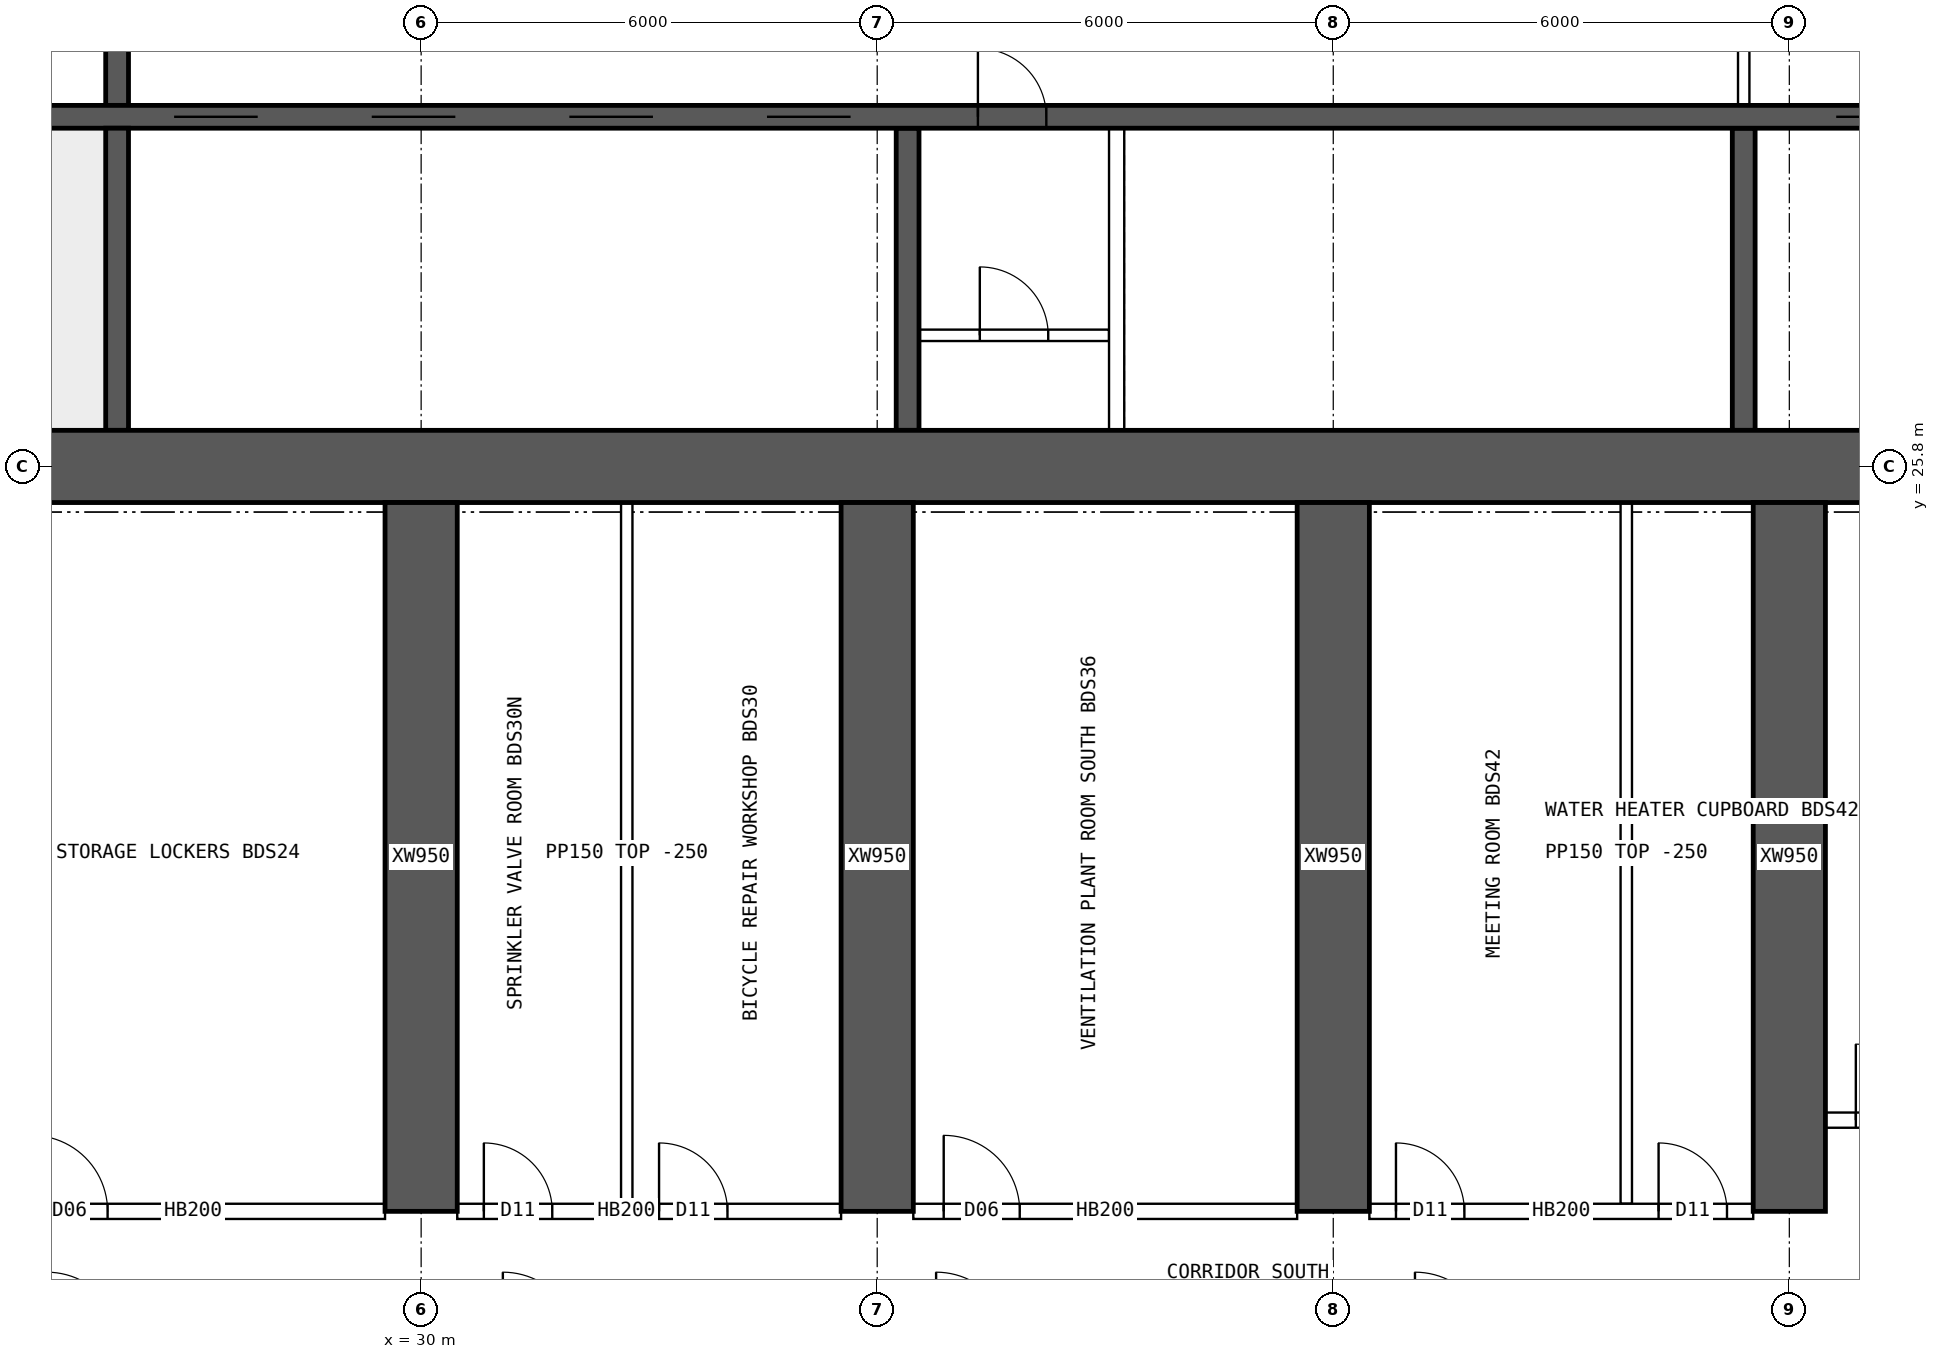
"""IFC4 building model, lengths in metres.
Left out: names, types, materials, properties, quantities, classifications, styles, units other than length and angle.
Written with IfcOpenShell. Run it as: python <this file> out.ifc"""

import sys

from ifc_helpers import new_model, si_unit, direction, frame, frame_2d, origin, place, context, subcontext, project, spatial, rectangle, extrude, element, fill, save


model = new_model("IFC4")
c1 = context("Model", 3, precision=1e-05, world=origin(), true_north=direction((0.0, 1.0)))
c2 = subcontext(c1, "Body", "Model", "MODEL_VIEW")
j1 = project(units=[si_unit("LENGTHUNIT", "METRE"), si_unit("PLANEANGLEUNIT", "RADIAN")], contexts=[c1])
p1 = place(None, origin())
s1 = spatial("IfcSite", under=j1, at=p1, CompositionType="ELEMENT")
p2 = place(p1, origin())
s2 = spatial("IfcBuilding", under=s1, at=p2, CompositionType="ELEMENT")
p3 = place(p2, frame((0.0, 0.0, 125.65)))
s3 = spatial("IfcBuildingStorey", under=s2, at=p3, CompositionType="ELEMENT", Elevation=125.65)
p4 = place(p3, frame((18.0, 25.8, 0.0), z_axis=(0.0, 0.0, 1.0), x_axis=(1.0, 0.0, 0.0)))
e1 = element("IfcWall", 1, at=p4, inside=s3, PredefinedType="SHEAR", context=c2, shape_type="SweptSolid", body=[
    extrude(rectangle(XDim=48.0, YDim=0.95, at=frame_2d((24.0, 0.0))), origin(), (0.0, 0.0, 1.0), 3.75),
])
p5 = place(p3, frame((18.475, 30.4, 0.0), z_axis=(0.0, 0.0, 1.0), x_axis=(1.0, 0.0, 0.0)))
e2 = element("IfcWall", 2, at=p5, inside=s3, PredefinedType="SHEAR", context=c2, shape_type="SweptSolid", body=[
    extrude(rectangle(XDim=47.05, YDim=0.3, at=frame_2d((23.525, 0.0))), origin(), (0.0, 0.0, 1.0), 3.75),
])
p6 = place(p5, frame((0.4, 0.0, 0.0)))
e3 = element("IfcOpeningElement", 3, at=p6, cuts=e2, PredefinedType="OPENING", context=c2, shape_type="SweptSolid", body=[
    extrude(rectangle(XDim=1.0, YDim=2.1, at=frame_2d((0.5, 1.05))), frame((0.0, 0.16, 0.0), z_axis=(0.0, -1.0, 0.0), x_axis=(1.0, 0.0, 0.0)), (0.0, 0.0, 1.0), 0.32),
])
p7 = place(p5, frame((45.65, 0.0, 0.0)))
e4 = element("IfcOpeningElement", 4, at=p7, cuts=e2, PredefinedType="OPENING", context=c2, shape_type="SweptSolid", body=[
    extrude(rectangle(XDim=1.0, YDim=2.1, at=frame_2d((0.5, 1.05))), frame((0.0, 0.16, 0.0), z_axis=(0.0, -1.0, 0.0), x_axis=(1.0, 0.0, 0.0)), (0.0, 0.0, 1.0), 0.32),
])
p8 = place(p5, frame((8.275, 0.0, 0.0)))
e5 = element("IfcOpeningElement", 5, at=p8, cuts=e2, PredefinedType="OPENING", context=c2, shape_type="SweptSolid", body=[
    extrude(rectangle(XDim=1.1, YDim=2.1, at=frame_2d((0.55, 1.05))), frame((0.0, 0.16, 0.0), z_axis=(0.0, -1.0, 0.0), x_axis=(1.0, 0.0, 0.0)), (0.0, 0.0, 1.0), 0.32),
])
p9 = place(p5, frame((10.875, 0.0, 0.0)))
e6 = element("IfcOpeningElement", 6, at=p9, cuts=e2, PredefinedType="OPENING", context=c2, shape_type="SweptSolid", body=[
    extrude(rectangle(XDim=1.1, YDim=2.1, at=frame_2d((0.55, 1.05))), frame((0.0, 0.16, 0.0), z_axis=(0.0, -1.0, 0.0), x_axis=(1.0, 0.0, 0.0)), (0.0, 0.0, 1.0), 0.32),
])
p10 = place(p5, frame((13.475, 0.0, 0.0)))
e7 = element("IfcOpeningElement", 7, at=p10, cuts=e2, PredefinedType="OPENING", context=c2, shape_type="SweptSolid", body=[
    extrude(rectangle(XDim=1.1, YDim=2.1, at=frame_2d((0.55, 1.05))), frame((0.0, 0.16, 0.0), z_axis=(0.0, -1.0, 0.0), x_axis=(1.0, 0.0, 0.0)), (0.0, 0.0, 1.0), 0.32),
])
p11 = place(p5, frame((16.075, 0.0, 0.0)))
e8 = element("IfcOpeningElement", 8, at=p11, cuts=e2, PredefinedType="OPENING", context=c2, shape_type="SweptSolid", body=[
    extrude(rectangle(XDim=1.1, YDim=2.1, at=frame_2d((0.55, 1.05))), frame((0.0, 0.16, 0.0), z_axis=(0.0, -1.0, 0.0), x_axis=(1.0, 0.0, 0.0)), (0.0, 0.0, 1.0), 0.32),
])
p12 = place(p5, frame((18.85, 0.0, 0.0)))
e9 = element("IfcOpeningElement", 9, at=p12, cuts=e2, PredefinedType="OPENING", context=c2, shape_type="SweptSolid", body=[
    extrude(rectangle(XDim=0.9, YDim=2.1, at=frame_2d((0.45, 1.05))), frame((0.0, 0.16, 0.0), z_axis=(0.0, -1.0, 0.0), x_axis=(1.0, 0.0, 0.0)), (0.0, 0.0, 1.0), 0.32),
])
p13 = place(p5, frame((30.142, 0.0, 0.0)))
e10 = element("IfcOpeningElement", 10, at=p13, cuts=e2, PredefinedType="OPENING", context=c2, shape_type="SweptSolid", body=[
    extrude(rectangle(XDim=1.1, YDim=2.1, at=frame_2d((0.55, 1.05))), frame((0.0, 0.16, 0.0), z_axis=(0.0, -1.0, 0.0), x_axis=(1.0, 0.0, 0.0)), (0.0, 0.0, 1.0), 0.32),
])
p14 = place(p5, frame((33.675, 0.0, 0.0)))
e11 = element("IfcOpeningElement", 11, at=p14, cuts=e2, PredefinedType="OPENING", context=c2, shape_type="SweptSolid", body=[
    extrude(rectangle(XDim=1.1, YDim=2.1, at=frame_2d((0.55, 1.05))), frame((0.0, 0.16, 0.0), z_axis=(0.0, -1.0, 0.0), x_axis=(1.0, 0.0, 0.0)), (0.0, 0.0, 1.0), 0.32),
])
p15 = place(p5, frame((37.208, 0.0, 0.0)))
e12 = element("IfcOpeningElement", 12, at=p15, cuts=e2, PredefinedType="OPENING", context=c2, shape_type="SweptSolid", body=[
    extrude(rectangle(XDim=1.1, YDim=2.1, at=frame_2d((0.55, 1.05))), frame((0.0, 0.16, 0.0), z_axis=(0.0, -1.0, 0.0), x_axis=(1.0, 0.0, 0.0)), (0.0, 0.0, 1.0), 0.32),
])
p16 = place(p3, frame((26.0, 26.275, 0.0), z_axis=(0.0, 0.0, 1.0), x_axis=(0.0, 1.0, 0.0)))
e13 = element("IfcWall", 13, at=p16, inside=s3, PredefinedType="SHEAR", context=c2, shape_type="SweptSolid", body=[
    extrude(rectangle(XDim=3.975, YDim=0.3, at=frame_2d((1.988, 0.0))), origin(), (0.0, 0.0, 1.0), 3.75),
])
p17 = place(p3, frame((26.0, 30.55, 0.0), z_axis=(0.0, 0.0, 1.0), x_axis=(0.0, 1.0, 0.0)))
e14 = element("IfcWall", 14, at=p17, inside=s3, PredefinedType="SHEAR", context=c2, shape_type="SweptSolid", body=[
    extrude(rectangle(XDim=3.9, YDim=0.3, at=frame_2d((1.95, 0.0))), origin(), (0.0, 0.0, 1.0), 3.75),
])
p18 = place(p17, frame((1.4, 0.0, 0.0)))
e15 = element("IfcOpeningElement", 15, at=p18, cuts=e14, PredefinedType="OPENING", context=c2, shape_type="SweptSolid", body=[
    extrude(rectangle(XDim=1.2, YDim=2.1, at=frame_2d((0.6, 1.05))), frame((0.0, 0.16, 0.0), z_axis=(0.0, -1.0, 0.0), x_axis=(1.0, 0.0, 0.0)), (0.0, 0.0, 1.0), 0.32),
])
for number, where, z_axis, x_axis in (
    (16, (36.4, 26.275, 0.0), (0.0, 0.0, 1.0), (0.0, 1.0, 0.0)),
    (17, (47.4, 26.275, 0.0), (0.0, 0.0, 1.0), (0.0, 1.0, 0.0)),
):
    element("IfcWall", number, at=place(p3, frame(where, z_axis=z_axis, x_axis=x_axis)), inside=s3, PredefinedType="SHEAR", context=c2, shape_type="SweptSolid", body=[
        extrude(rectangle(XDim=3.975, YDim=0.3, at=frame_2d((1.988, 0.0))), origin(), (0.0, 0.0, 1.0), 3.75),
    ])
for number, where, z_axis, x_axis in (
    (18, (30.0, 16.0, 0.0), (0.0, 0.0, 1.0), (0.0, 1.0, 0.0)),
    (19, (36.0, 16.0, 0.0), (0.0, 0.0, 1.0), (0.0, 1.0, 0.0)),
    (20, (42.0, 16.0, 0.0), (0.0, 0.0, 1.0), (0.0, 1.0, 0.0)),
    (21, (48.0, 16.0, 0.0), (0.0, 0.0, 1.0), (0.0, 1.0, 0.0)),
):
    element("IfcWall", number, at=place(p3, frame(where, z_axis=z_axis, x_axis=x_axis)), inside=s3, PredefinedType="SHEAR", context=c2, shape_type="SweptSolid", body=[
        extrude(rectangle(XDim=9.325, YDim=0.95, at=frame_2d((4.663, 0.0))), origin(), (0.0, 0.0, 1.0), 3.75),
    ])
p19 = place(p3, frame((47.4, 30.55, 0.0), z_axis=(0.0, 0.0, 1.0), x_axis=(0.0, 1.0, 0.0)))
e22 = element("IfcWall", 22, at=p19, inside=s3, PredefinedType="SOLIDWALL", context=c2, shape_type="SweptSolid", body=[
    extrude(rectangle(XDim=3.9, YDim=0.15, at=frame_2d((1.95, 0.0))), origin(), (0.0, 0.0, 1.0), 3.5),
])
p20 = place(p19, frame((1.15, 0.0, 0.0)))
e23 = element("IfcOpeningElement", 23, at=p20, cuts=e22, PredefinedType="OPENING", context=c2, shape_type="SweptSolid", body=[
    extrude(rectangle(XDim=1.6, YDim=2.1, at=frame_2d((0.8, 1.05))), frame((0.0, 0.085, 0.0), z_axis=(0.0, -1.0, 0.0), x_axis=(1.0, 0.0, 0.0)), (0.0, 0.0, 1.0), 0.17),
])
p21 = place(p3, frame((36.55, 27.525, 0.0), z_axis=(0.0, 0.0, 1.0), x_axis=(1.0, 0.0, 0.0)))
e24 = element("IfcWall", 24, at=p21, inside=s3, PredefinedType="SOLIDWALL", context=c2, shape_type="SweptSolid", body=[
    extrude(rectangle(XDim=2.5, YDim=0.15, at=frame_2d((1.25, 0.0))), origin(), (0.0, 0.0, 1.0), 3.5),
])
p22 = place(p21, frame((0.8, 0.0, 0.0)))
e25 = element("IfcOpeningElement", 25, at=p22, cuts=e24, PredefinedType="OPENING", context=c2, shape_type="SweptSolid", body=[
    extrude(rectangle(XDim=0.9, YDim=2.1, at=frame_2d((0.45, 1.05))), frame((0.0, 0.085, 0.0), z_axis=(0.0, -1.0, 0.0), x_axis=(1.0, 0.0, 0.0)), (0.0, 0.0, 1.0), 0.17),
])
p23 = place(p3, frame((39.15, 26.275, 0.0), z_axis=(0.0, 0.0, 1.0), x_axis=(0.0, 1.0, 0.0)))
e26 = element("IfcWall", 26, at=p23, inside=s3, PredefinedType="SOLIDWALL", context=c2, shape_type="SweptSolid", body=[
    extrude(rectangle(XDim=3.975, YDim=0.2, at=frame_2d((1.988, 0.0))), origin(), (0.0, 0.0, 1.0), 3.5),
])
p24 = place(p3, frame((24.475, 16.0, 0.0), z_axis=(0.0, 0.0, 1.0), x_axis=(1.0, 0.0, 0.0)))
e27 = element("IfcWall", 27, at=p24, inside=s3, PredefinedType="SOLIDWALL", context=c2, shape_type="SweptSolid", body=[
    extrude(rectangle(XDim=5.05, YDim=0.2, at=frame_2d((2.525, 0.0))), origin(), (0.0, 0.0, 1.0), 3.5),
])
p25 = place(p24, frame((0.4, 0.0, 0.0)))
e28 = element("IfcOpeningElement", 28, at=p25, cuts=e27, PredefinedType="OPENING", context=c2, shape_type="SweptSolid", body=[
    extrude(rectangle(XDim=1.0, YDim=2.1, at=frame_2d((0.5, 1.05))), frame((0.0, 0.11, 0.0), z_axis=(0.0, -1.0, 0.0), x_axis=(1.0, 0.0, 0.0)), (0.0, 0.0, 1.0), 0.22),
])
p26 = place(p3, frame((30.475, 16.0, 0.0), z_axis=(0.0, 0.0, 1.0), x_axis=(1.0, 0.0, 0.0)))
e29 = element("IfcWall", 29, at=p26, inside=s3, PredefinedType="SOLIDWALL", context=c2, shape_type="SweptSolid", body=[
    extrude(rectangle(XDim=5.05, YDim=0.2, at=frame_2d((2.525, 0.0))), origin(), (0.0, 0.0, 1.0), 3.5),
])
p27 = place(p26, frame((0.35, 0.0, 0.0)))
e30 = element("IfcOpeningElement", 30, at=p27, cuts=e29, PredefinedType="OPENING", context=c2, shape_type="SweptSolid", body=[
    extrude(rectangle(XDim=0.9, YDim=2.1, at=frame_2d((0.45, 1.05))), frame((0.0, 0.11, 0.0), z_axis=(0.0, -1.0, 0.0), x_axis=(1.0, 0.0, 0.0)), (0.0, 0.0, 1.0), 0.22),
])
p28 = place(p26, frame((2.655, 0.0, 0.0)))
e31 = element("IfcOpeningElement", 31, at=p28, cuts=e29, PredefinedType="OPENING", context=c2, shape_type="SweptSolid", body=[
    extrude(rectangle(XDim=0.9, YDim=2.1, at=frame_2d((0.45, 1.05))), frame((0.0, 0.11, 0.0), z_axis=(0.0, -1.0, 0.0), x_axis=(1.0, 0.0, 0.0)), (0.0, 0.0, 1.0), 0.22),
])
p29 = place(p3, frame((36.475, 16.0, 0.0), z_axis=(0.0, 0.0, 1.0), x_axis=(1.0, 0.0, 0.0)))
e32 = element("IfcWall", 32, at=p29, inside=s3, PredefinedType="SOLIDWALL", context=c2, shape_type="SweptSolid", body=[
    extrude(rectangle(XDim=5.05, YDim=0.2, at=frame_2d((2.525, 0.0))), origin(), (0.0, 0.0, 1.0), 3.5),
])
p30 = place(p29, frame((0.4, 0.0, 0.0)))
e33 = element("IfcOpeningElement", 33, at=p30, cuts=e32, PredefinedType="OPENING", context=c2, shape_type="SweptSolid", body=[
    extrude(rectangle(XDim=1.0, YDim=2.1, at=frame_2d((0.5, 1.05))), frame((0.0, 0.11, 0.0), z_axis=(0.0, -1.0, 0.0), x_axis=(1.0, 0.0, 0.0)), (0.0, 0.0, 1.0), 0.22),
])
p31 = place(p3, frame((42.475, 16.0, 0.0), z_axis=(0.0, 0.0, 1.0), x_axis=(1.0, 0.0, 0.0)))
e34 = element("IfcWall", 34, at=p31, inside=s3, PredefinedType="SOLIDWALL", context=c2, shape_type="SweptSolid", body=[
    extrude(rectangle(XDim=5.05, YDim=0.2, at=frame_2d((2.525, 0.0))), origin(), (0.0, 0.0, 1.0), 3.5),
])
p32 = place(p31, frame((0.35, 0.0, 0.0)))
e35 = element("IfcOpeningElement", 35, at=p32, cuts=e34, PredefinedType="OPENING", context=c2, shape_type="SweptSolid", body=[
    extrude(rectangle(XDim=0.9, YDim=2.1, at=frame_2d((0.45, 1.05))), frame((0.0, 0.11, 0.0), z_axis=(0.0, -1.0, 0.0), x_axis=(1.0, 0.0, 0.0)), (0.0, 0.0, 1.0), 0.22),
])
p33 = place(p31, frame((3.805, 0.0, 0.0)))
e36 = element("IfcOpeningElement", 36, at=p33, cuts=e34, PredefinedType="OPENING", context=c2, shape_type="SweptSolid", body=[
    extrude(rectangle(XDim=0.9, YDim=2.1, at=frame_2d((0.45, 1.05))), frame((0.0, 0.11, 0.0), z_axis=(0.0, -1.0, 0.0), x_axis=(1.0, 0.0, 0.0)), (0.0, 0.0, 1.0), 0.22),
])
for number, where, z_axis, x_axis in (
    (37, (32.705, 16.1, 0.0), (0.0, 0.0, 1.0), (0.0, 1.0, 0.0)),
    (38, (45.855, 16.1, 0.0), (0.0, 0.0, 1.0), (0.0, 1.0, 0.0)),
):
    element("IfcWall", number, at=place(p3, frame(where, z_axis=z_axis, x_axis=x_axis)), inside=s3, PredefinedType="PARTITIONING", context=c2, shape_type="SweptSolid", body=[
        extrude(rectangle(XDim=9.225, YDim=0.15, at=frame_2d((4.612, 0.0))), origin(), (0.0, 0.0, 1.0), 3.5),
    ])
p34 = place(p3, frame((48.475, 17.2, 0.0), z_axis=(0.0, 0.0, 1.0), x_axis=(1.0, 0.0, 0.0)))
e39 = element("IfcWall", 39, at=p34, inside=s3, PredefinedType="SOLIDWALL", context=c2, shape_type="SweptSolid", body=[
    extrude(rectangle(XDim=5.05, YDim=0.2, at=frame_2d((2.525, 0.0))), origin(), (0.0, 0.0, 1.0), 3.5),
])
p35 = place(p34, frame((0.4, 0.0, 0.0)))
e40 = element("IfcOpeningElement", 40, at=p35, cuts=e39, PredefinedType="OPENING", context=c2, shape_type="SweptSolid", body=[
    extrude(rectangle(XDim=1.0, YDim=2.1, at=frame_2d((0.5, 1.05))), frame((0.0, 0.11, 0.0), z_axis=(0.0, -1.0, 0.0), x_axis=(1.0, 0.0, 0.0)), (0.0, 0.0, 1.0), 0.22),
])
p36 = place(p8, origin())
e41 = element("IfcDoor", 41, at=p36, inside=s3, OperationType="DOUBLE_DOOR_SLIDING", PredefinedType="DOOR", context=c2, shape_type="SweptSolid", body=[
    extrude(rectangle(XDim=1.1, YDim=2.1, at=frame_2d((0.55, 1.05))), frame((0.0, 0.025, 0.0), z_axis=(0.0, -1.0, 0.0), x_axis=(1.0, 0.0, 0.0)), (0.0, 0.0, 1.0), 0.05),
])
fill(e5, e41)
p37 = place(p9, origin())
e42 = element("IfcDoor", 42, at=p37, inside=s3, OperationType="DOUBLE_DOOR_SLIDING", PredefinedType="DOOR", context=c2, shape_type="SweptSolid", body=[
    extrude(rectangle(XDim=1.1, YDim=2.1, at=frame_2d((0.55, 1.05))), frame((0.0, 0.025, 0.0), z_axis=(0.0, -1.0, 0.0), x_axis=(1.0, 0.0, 0.0)), (0.0, 0.0, 1.0), 0.05),
])
fill(e6, e42)
p38 = place(p10, origin())
e43 = element("IfcDoor", 43, at=p38, inside=s3, OperationType="DOUBLE_DOOR_SLIDING", PredefinedType="DOOR", context=c2, shape_type="SweptSolid", body=[
    extrude(rectangle(XDim=1.1, YDim=2.1, at=frame_2d((0.55, 1.05))), frame((0.0, 0.025, 0.0), z_axis=(0.0, -1.0, 0.0), x_axis=(1.0, 0.0, 0.0)), (0.0, 0.0, 1.0), 0.05),
])
fill(e7, e43)
p39 = place(p11, origin())
e44 = element("IfcDoor", 44, at=p39, inside=s3, OperationType="DOUBLE_DOOR_SLIDING", PredefinedType="DOOR", context=c2, shape_type="SweptSolid", body=[
    extrude(rectangle(XDim=1.1, YDim=2.1, at=frame_2d((0.55, 1.05))), frame((0.0, 0.025, 0.0), z_axis=(0.0, -1.0, 0.0), x_axis=(1.0, 0.0, 0.0)), (0.0, 0.0, 1.0), 0.05),
])
fill(e8, e44)
p40 = place(p22, origin())
e45 = element("IfcDoor", 45, at=p40, inside=s3, OperationType="SINGLE_SWING_LEFT", PredefinedType="DOOR", context=c2, shape_type="SweptSolid", body=[
    extrude(rectangle(XDim=0.9, YDim=2.1, at=frame_2d((0.45, 1.05))), frame((0.0, 0.025, 0.0), z_axis=(0.0, -1.0, 0.0), x_axis=(1.0, 0.0, 0.0)), (0.0, 0.0, 1.0), 0.05),
])
fill(e25, e45)
p41 = place(p12, origin())
e46 = element("IfcDoor", 46, at=p41, inside=s3, OperationType="SINGLE_SWING_LEFT", PredefinedType="DOOR", context=c2, shape_type="SweptSolid", body=[
    extrude(rectangle(XDim=0.9, YDim=2.1, at=frame_2d((0.45, 1.05))), frame((0.0, 0.025, 0.0), z_axis=(0.0, -1.0, 0.0), x_axis=(1.0, 0.0, 0.0)), (0.0, 0.0, 1.0), 0.05),
])
fill(e9, e46)
p42 = place(p13, origin())
e47 = element("IfcDoor", 47, at=p42, inside=s3, OperationType="DOUBLE_DOOR_SLIDING", PredefinedType="DOOR", context=c2, shape_type="SweptSolid", body=[
    extrude(rectangle(XDim=1.1, YDim=2.1, at=frame_2d((0.55, 1.05))), frame((0.0, 0.025, 0.0), z_axis=(0.0, -1.0, 0.0), x_axis=(1.0, 0.0, 0.0)), (0.0, 0.0, 1.0), 0.05),
])
fill(e10, e47)
p43 = place(p25, origin())
e48 = element("IfcDoor", 48, at=p43, inside=s3, OperationType="SINGLE_SWING_LEFT", PredefinedType="DOOR", context=c2, shape_type="SweptSolid", body=[
    extrude(rectangle(XDim=1.0, YDim=2.1, at=frame_2d((0.5, 1.05))), frame((0.0, 0.025, 0.0), z_axis=(0.0, -1.0, 0.0), x_axis=(1.0, 0.0, 0.0)), (0.0, 0.0, 1.0), 0.05),
])
fill(e28, e48)
p44 = place(p27, origin())
e49 = element("IfcDoor", 49, at=p44, inside=s3, OperationType="SINGLE_SWING_LEFT", PredefinedType="DOOR", context=c2, shape_type="SweptSolid", body=[
    extrude(rectangle(XDim=0.9, YDim=2.1, at=frame_2d((0.45, 1.05))), frame((0.0, 0.025, 0.0), z_axis=(0.0, -1.0, 0.0), x_axis=(1.0, 0.0, 0.0)), (0.0, 0.0, 1.0), 0.05),
])
fill(e30, e49)
p45 = place(p28, origin())
e50 = element("IfcDoor", 50, at=p45, inside=s3, OperationType="SINGLE_SWING_LEFT", PredefinedType="DOOR", context=c2, shape_type="SweptSolid", body=[
    extrude(rectangle(XDim=0.9, YDim=2.1, at=frame_2d((0.45, 1.05))), frame((0.0, 0.025, 0.0), z_axis=(0.0, -1.0, 0.0), x_axis=(1.0, 0.0, 0.0)), (0.0, 0.0, 1.0), 0.05),
])
fill(e31, e50)
p46 = place(p30, origin())
e51 = element("IfcDoor", 51, at=p46, inside=s3, OperationType="SINGLE_SWING_LEFT", PredefinedType="DOOR", context=c2, shape_type="SweptSolid", body=[
    extrude(rectangle(XDim=1.0, YDim=2.1, at=frame_2d((0.5, 1.05))), frame((0.0, 0.025, 0.0), z_axis=(0.0, -1.0, 0.0), x_axis=(1.0, 0.0, 0.0)), (0.0, 0.0, 1.0), 0.05),
])
fill(e33, e51)
p47 = place(p32, origin())
e52 = element("IfcDoor", 52, at=p47, inside=s3, OperationType="SINGLE_SWING_LEFT", PredefinedType="DOOR", context=c2, shape_type="SweptSolid", body=[
    extrude(rectangle(XDim=0.9, YDim=2.1, at=frame_2d((0.45, 1.05))), frame((0.0, 0.025, 0.0), z_axis=(0.0, -1.0, 0.0), x_axis=(1.0, 0.0, 0.0)), (0.0, 0.0, 1.0), 0.05),
])
fill(e35, e52)
p48 = place(p33, origin())
e53 = element("IfcDoor", 53, at=p48, inside=s3, OperationType="SINGLE_SWING_LEFT", PredefinedType="DOOR", context=c2, shape_type="SweptSolid", body=[
    extrude(rectangle(XDim=0.9, YDim=2.1, at=frame_2d((0.45, 1.05))), frame((0.0, 0.025, 0.0), z_axis=(0.0, -1.0, 0.0), x_axis=(1.0, 0.0, 0.0)), (0.0, 0.0, 1.0), 0.05),
])
fill(e36, e53)
p49 = place(p35, origin())
e54 = element("IfcDoor", 54, at=p49, inside=s3, OperationType="SINGLE_SWING_LEFT", PredefinedType="DOOR", context=c2, shape_type="SweptSolid", body=[
    extrude(rectangle(XDim=1.0, YDim=2.1, at=frame_2d((0.5, 1.05))), frame((0.0, 0.025, 0.0), z_axis=(0.0, -1.0, 0.0), x_axis=(1.0, 0.0, 0.0)), (0.0, 0.0, 1.0), 0.05),
])
fill(e40, e54)
save(model, sys.argv[1])
